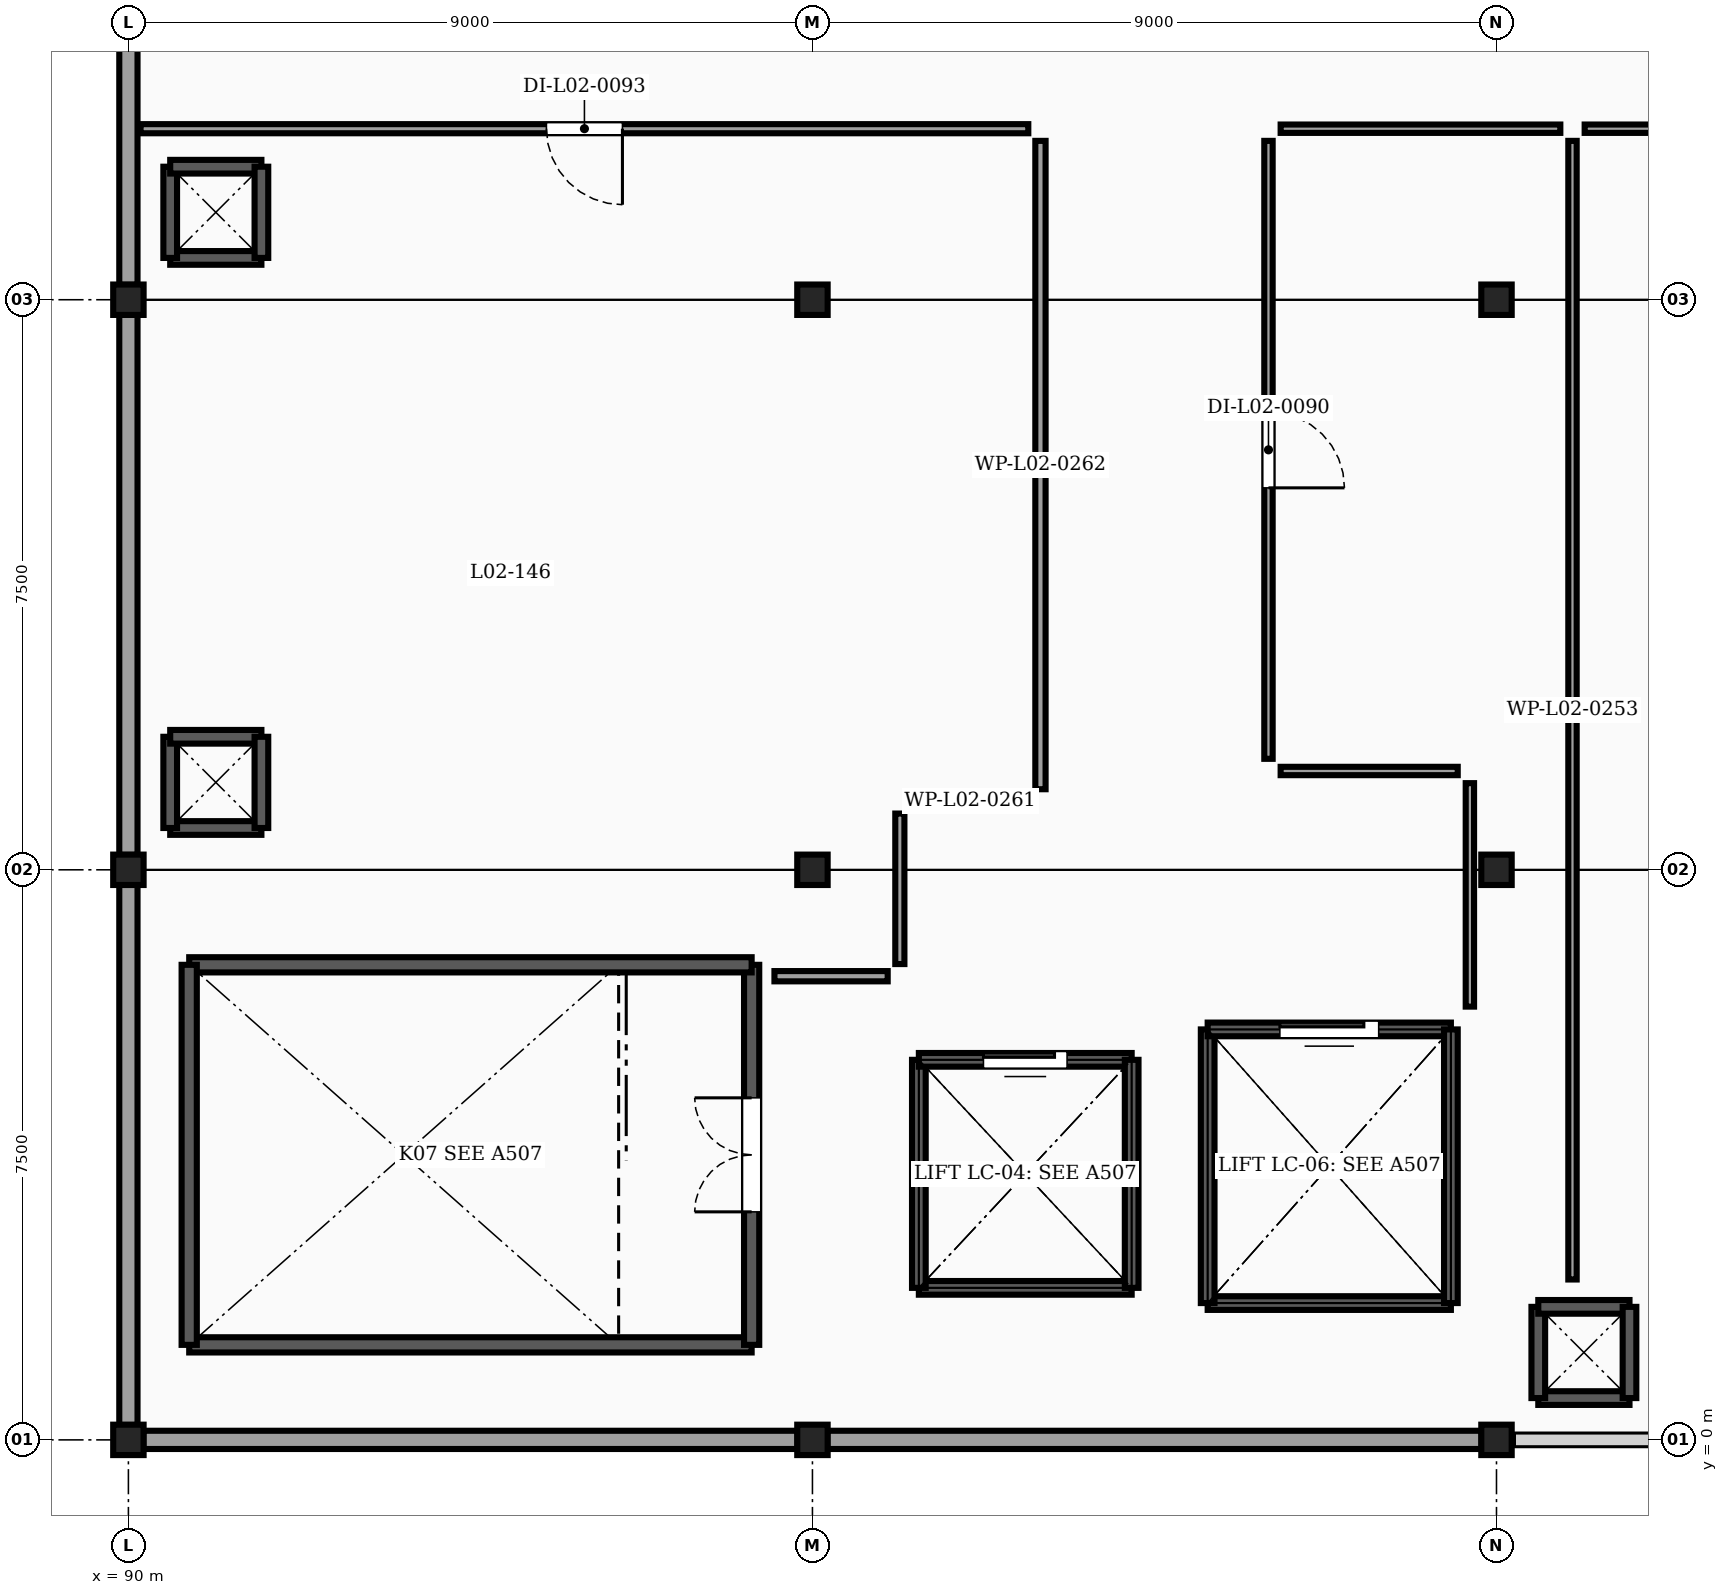
"""IFC4 building model, lengths in metres.
Left out: names, types, materials, properties, quantities, classifications, styles, units other than length and angle.
Written with IfcOpenShell. Run it as: python <this file> out.ifc"""

import sys

from ifc_helpers import new_model, si_unit, direction, frame, frame_2d, origin, origin_2d, place, context, subcontext, project, spatial, rectangle, extrude, element, fill, save


model = new_model("IFC4")
c1 = context("Model", 3, precision=1e-05, world=origin(), true_north=direction((0.0, 1.0)))
c2 = subcontext(c1, "Body", "Model", "MODEL_VIEW")
j1 = project(units=[si_unit("LENGTHUNIT", "METRE"), si_unit("PLANEANGLEUNIT", "RADIAN")], contexts=[c1])
p1 = place(None, origin())
s1 = spatial("IfcSite", under=j1, at=p1, CompositionType="ELEMENT")
p2 = place(p1, origin())
s2 = spatial("IfcBuilding", under=s1, at=p2, CompositionType="ELEMENT")
p3 = place(p2, frame((0.0, 0.0, 8.5)))
s3 = spatial("IfcBuildingStorey", under=s2, at=p3, CompositionType="ELEMENT", Elevation=8.5)
for number, where, z_axis, x_axis in (
    (1, (90.0, 0.0, 0.0), (0.0, 0.0, 1.0), (1.0, 0.0, 0.0)),
    (2, (99.0, 0.0, 0.0), (0.0, 0.0, 1.0), (1.0, 0.0, 0.0)),
    (3, (108.0, 0.0, 0.0), (0.0, 0.0, 1.0), (1.0, 0.0, 0.0)),
    (4, (90.0, 7.5, 0.0), (0.0, 0.0, 1.0), (1.0, 0.0, 0.0)),
    (5, (99.0, 7.5, 0.0), (0.0, 0.0, 1.0), (1.0, 0.0, 0.0)),
    (6, (108.0, 7.5, 0.0), (0.0, 0.0, 1.0), (1.0, 0.0, 0.0)),
    (7, (90.0, 15.0, 0.0), (0.0, 0.0, 1.0), (1.0, 0.0, 0.0)),
    (8, (99.0, 15.0, 0.0), (0.0, 0.0, 1.0), (1.0, 0.0, 0.0)),
    (9, (108.0, 15.0, 0.0), (0.0, 0.0, 1.0), (1.0, 0.0, 0.0)),
):
    element("IfcColumn", number, at=place(p3, frame(where, z_axis=z_axis, x_axis=x_axis)), inside=s3, PredefinedType="COLUMN", context=c2, shape_type="SweptSolid", body=[
        extrude(rectangle(XDim=0.4, YDim=0.4, at=origin_2d()), origin(), (0.0, 0.0, 1.0), 3.42),
    ])
for number, where, z_axis, x_axis in (
    (10, (107.804, 0.0, 0.0), (0.0, 0.0, 1.0), (-1.0, 0.0, 0.0)),
    (11, (98.804, 0.0, 0.0), (0.0, 0.0, 1.0), (-1.0, 0.0, 0.0)),
):
    element("IfcWall", number, at=place(p3, frame(where, z_axis=z_axis, x_axis=x_axis)), inside=s3, PredefinedType="SOLIDWALL", context=c2, shape_type="SweptSolid", body=[
        extrude(rectangle(XDim=8.608, YDim=0.24, at=frame_2d((4.304, 0.0))), origin(), (0.0, 0.0, 1.0), 2.827),
    ])
for number, where, z_axis, x_axis in (
    (12, (90.0, 0.196, 0.0), (0.0, 0.0, 1.0), (0.0, 1.0, 0.0)),
    (13, (90.0, 7.696, 0.0), (0.0, 0.0, 1.0), (0.0, 1.0, 0.0)),
    (14, (90.0, 15.196, 0.0), (0.0, 0.0, 1.0), (0.0, 1.0, 0.0)),
):
    element("IfcWall", number, at=place(p3, frame(where, z_axis=z_axis, x_axis=x_axis)), inside=s3, PredefinedType="SOLIDWALL", context=c2, shape_type="SweptSolid", body=[
        extrude(rectangle(XDim=7.108, YDim=0.24, at=frame_2d((3.554, 0.0))), origin(), (0.0, 0.0, 1.0), 2.827),
    ])
for number, where, z_axis, x_axis in (
    (15, (109.75, 0.55, 0.0), (0.0, 0.0, 1.0), (-1.0, 0.0, 0.0)),
    (16, (108.55, 0.55, 0.0), (0.0, 0.0, 1.0), (0.0, 1.0, 0.0)),
    (17, (108.55, 1.75, 0.0), (0.0, 0.0, 1.0), (1.0, 0.0, 0.0)),
    (18, (109.75, 1.75, 0.0), (0.0, 0.0, 1.0), (0.0, -1.0, 0.0)),
    (19, (91.75, 8.05, 0.0), (0.0, 0.0, 1.0), (-1.0, 0.0, 0.0)),
    (20, (90.55, 8.05, 0.0), (0.0, 0.0, 1.0), (0.0, 1.0, 0.0)),
    (21, (90.55, 9.25, 0.0), (0.0, 0.0, 1.0), (1.0, 0.0, 0.0)),
    (22, (91.75, 9.25, 0.0), (0.0, 0.0, 1.0), (0.0, -1.0, 0.0)),
    (23, (91.75, 15.55, 0.0), (0.0, 0.0, 1.0), (-1.0, 0.0, 0.0)),
    (24, (90.55, 15.55, 0.0), (0.0, 0.0, 1.0), (0.0, 1.0, 0.0)),
    (25, (90.55, 16.75, 0.0), (0.0, 0.0, 1.0), (1.0, 0.0, 0.0)),
    (26, (91.75, 16.75, 0.0), (0.0, 0.0, 1.0), (0.0, -1.0, 0.0)),
):
    element("IfcWall", number, at=place(p3, frame(where, z_axis=z_axis, x_axis=x_axis)), inside=s3, PredefinedType="SHEAR", context=c2, shape_type="SweptSolid", body=[
        extrude(rectangle(XDim=1.2, YDim=0.18, at=frame_2d((0.6, 0.0))), origin(), (0.0, 0.0, 1.0), 3.42),
    ])
p4 = place(p3, frame((90.8, 1.25, 0.0), z_axis=(0.0, 0.0, 1.0), x_axis=(1.0, 0.0, 0.0)))
e27 = element("IfcWall", 27, at=p4, inside=s3, PredefinedType="SHEAR", context=c2, shape_type="SweptSolid", body=[
    extrude(rectangle(XDim=7.4, YDim=0.2, at=frame_2d((3.7, 0.0))), origin(), (0.0, 0.0, 1.0), 3.42),
])
p5 = place(p3, frame((98.2, 1.25, 0.0), z_axis=(0.0, 0.0, 1.0), x_axis=(0.0, 1.0, 0.0)))
e28 = element("IfcWall", 28, at=p5, inside=s3, PredefinedType="SHEAR", context=c2, shape_type="SweptSolid", body=[
    extrude(rectangle(XDim=5.0, YDim=0.2, at=frame_2d((2.5, 0.0))), origin(), (0.0, 0.0, 1.0), 3.42),
])
p6 = place(p5, frame((1.75, 0.0, 0.0)))
e29 = element("IfcOpeningElement", 29, at=p6, cuts=e28, PredefinedType="OPENING", context=c2, shape_type="SweptSolid", body=[
    extrude(rectangle(XDim=1.5, YDim=2.15, at=frame_2d((0.75, 1.075))), frame((0.0, 0.11, 0.0), z_axis=(0.0, -1.0, 0.0), x_axis=(1.0, 0.0, 0.0)), (0.0, 0.0, 1.0), 0.22),
])
p7 = place(p3, frame((98.2, 6.25, 0.0), z_axis=(0.0, 0.0, 1.0), x_axis=(-1.0, 0.0, 0.0)))
e30 = element("IfcWall", 30, at=p7, inside=s3, PredefinedType="SHEAR", context=c2, shape_type="SweptSolid", body=[
    extrude(rectangle(XDim=7.4, YDim=0.2, at=frame_2d((3.7, 0.0))), origin(), (0.0, 0.0, 1.0), 3.42),
])
p8 = place(p3, frame((90.8, 6.25, 0.0), z_axis=(0.0, 0.0, 1.0), x_axis=(0.0, -1.0, 0.0)))
e31 = element("IfcWall", 31, at=p8, inside=s3, PredefinedType="SHEAR", context=c2, shape_type="SweptSolid", body=[
    extrude(rectangle(XDim=5.0, YDim=0.2, at=frame_2d((2.5, 0.0))), origin(), (0.0, 0.0, 1.0), 3.42),
])
p9 = place(p3, frame((103.2, 2.0, 0.0), z_axis=(0.0, 0.0, 1.0), x_axis=(-1.0, 0.0, 0.0)))
e32 = element("IfcWall", 32, at=p9, inside=s3, PredefinedType="SHEAR", context=c2, shape_type="SweptSolid", body=[
    extrude(rectangle(XDim=2.8, YDim=0.18, at=frame_2d((1.4, 0.0))), origin(), (0.0, 0.0, 1.0), 3.42),
])
p10 = place(p3, frame((100.4, 2.0, 0.0), z_axis=(0.0, 0.0, 1.0), x_axis=(0.0, 1.0, 0.0)))
e33 = element("IfcWall", 33, at=p10, inside=s3, PredefinedType="SHEAR", context=c2, shape_type="SweptSolid", body=[
    extrude(rectangle(XDim=3.0, YDim=0.18, at=frame_2d((1.5, 0.0))), origin(), (0.0, 0.0, 1.0), 3.42),
])
p11 = place(p3, frame((100.4, 5.0, 0.0), z_axis=(0.0, 0.0, 1.0), x_axis=(1.0, 0.0, 0.0)))
e34 = element("IfcWall", 34, at=p11, inside=s3, PredefinedType="SHEAR", context=c2, shape_type="SweptSolid", body=[
    extrude(rectangle(XDim=2.8, YDim=0.18, at=frame_2d((1.4, 0.0))), origin(), (0.0, 0.0, 1.0), 3.42),
])
p12 = place(p11, frame((0.85, 0.0, 0.0)))
e35 = element("IfcOpeningElement", 35, at=p12, cuts=e34, PredefinedType="OPENING", context=c2, shape_type="SweptSolid", body=[
    extrude(rectangle(XDim=1.1, YDim=2.15, at=frame_2d((0.55, 1.075))), frame((0.0, 0.1, 0.0), z_axis=(0.0, -1.0, 0.0), x_axis=(1.0, 0.0, 0.0)), (0.0, 0.0, 1.0), 0.2),
])
p13 = place(p3, frame((103.2, 5.0, 0.0), z_axis=(0.0, 0.0, 1.0), x_axis=(0.0, -1.0, 0.0)))
e36 = element("IfcWall", 36, at=p13, inside=s3, PredefinedType="SHEAR", context=c2, shape_type="SweptSolid", body=[
    extrude(rectangle(XDim=3.0, YDim=0.18, at=frame_2d((1.5, 0.0))), origin(), (0.0, 0.0, 1.0), 3.42),
])
p14 = place(p3, frame((107.4, 1.8, 0.0), z_axis=(0.0, 0.0, 1.0), x_axis=(-1.0, 0.0, 0.0)))
e37 = element("IfcWall", 37, at=p14, inside=s3, PredefinedType="SHEAR", context=c2, shape_type="SweptSolid", body=[
    extrude(rectangle(XDim=3.2, YDim=0.18, at=frame_2d((1.6, 0.0))), origin(), (0.0, 0.0, 1.0), 3.42),
])
p15 = place(p3, frame((104.2, 1.8, 0.0), z_axis=(0.0, 0.0, 1.0), x_axis=(0.0, 1.0, 0.0)))
e38 = element("IfcWall", 38, at=p15, inside=s3, PredefinedType="SHEAR", context=c2, shape_type="SweptSolid", body=[
    extrude(rectangle(XDim=3.6, YDim=0.18, at=frame_2d((1.8, 0.0))), origin(), (0.0, 0.0, 1.0), 3.42),
])
p16 = place(p3, frame((104.2, 5.4, 0.0), z_axis=(0.0, 0.0, 1.0), x_axis=(1.0, 0.0, 0.0)))
e39 = element("IfcWall", 39, at=p16, inside=s3, PredefinedType="SHEAR", context=c2, shape_type="SweptSolid", body=[
    extrude(rectangle(XDim=3.2, YDim=0.18, at=frame_2d((1.6, 0.0))), origin(), (0.0, 0.0, 1.0), 3.42),
])
p17 = place(p16, frame((0.95, 0.0, 0.0)))
e40 = element("IfcOpeningElement", 40, at=p17, cuts=e39, PredefinedType="OPENING", context=c2, shape_type="SweptSolid", body=[
    extrude(rectangle(XDim=1.3, YDim=2.2, at=frame_2d((0.65, 1.1))), frame((0.0, 0.1, 0.0), z_axis=(0.0, -1.0, 0.0), x_axis=(1.0, 0.0, 0.0)), (0.0, 0.0, 1.0), 0.2),
])
p18 = place(p3, frame((107.4, 5.4, 0.0), z_axis=(0.0, 0.0, 1.0), x_axis=(0.0, -1.0, 0.0)))
e41 = element("IfcWall", 41, at=p18, inside=s3, PredefinedType="SHEAR", context=c2, shape_type="SweptSolid", body=[
    extrude(rectangle(XDim=3.6, YDim=0.18, at=frame_2d((1.8, 0.0))), origin(), (0.0, 0.0, 1.0), 3.42),
])
p19 = place(p3, frame((109.0, 2.11, 0.0), z_axis=(0.0, 0.0, 1.0), x_axis=(0.0, 1.0, 0.0)))
e42 = element("IfcWall", 42, at=p19, inside=s3, PredefinedType="PARTITIONING", context=c2, shape_type="SweptSolid", body=[
    extrude(rectangle(XDim=14.98, YDim=0.11, at=frame_2d((7.49, 0.0))), origin(), (0.0, 0.0, 1.0), 3.42),
])
p20 = place(p3, frame((107.65, 8.64, 0.0), z_axis=(0.0, 0.0, 1.0), x_axis=(0.0, -1.0, 0.0)))
e43 = element("IfcWall", 43, at=p20, inside=s3, PredefinedType="PARTITIONING", context=c2, shape_type="SweptSolid", body=[
    extrude(rectangle(XDim=2.94, YDim=0.11, at=frame_2d((1.47, 0.0))), origin(), (0.0, 0.0, 1.0), 3.42),
])
p21 = place(p3, frame((105.16, 8.8, 0.0), z_axis=(0.0, 0.0, 1.0), x_axis=(1.0, 0.0, 0.0)))
e44 = element("IfcWall", 44, at=p21, inside=s3, PredefinedType="PARTITIONING", context=c2, shape_type="SweptSolid", body=[
    extrude(rectangle(XDim=2.33, YDim=0.11, at=frame_2d((1.165, 0.0))), origin(), (0.0, 0.0, 1.0), 3.42),
])
p22 = place(p3, frame((105.0, 17.09, 0.0), z_axis=(0.0, 0.0, 1.0), x_axis=(0.0, -1.0, 0.0)))
e45 = element("IfcWall", 45, at=p22, inside=s3, PredefinedType="PARTITIONING", context=c2, shape_type="SweptSolid", body=[
    extrude(rectangle(XDim=8.13, YDim=0.11, at=frame_2d((4.065, 0.0))), origin(), (0.0, 0.0, 1.0), 3.112),
])
p23 = place(p22, frame((3.565, 0.0, 0.0)))
e46 = element("IfcOpeningElement", 46, at=p23, cuts=e45, PredefinedType="OPENING", context=c2, shape_type="SweptSolid", body=[
    extrude(rectangle(XDim=1.0, YDim=2.15, at=frame_2d((0.5, 1.075))), frame((0.0, 0.065, 0.0), z_axis=(0.0, -1.0, 0.0), x_axis=(1.0, 0.0, 0.0)), (0.0, 0.0, 1.0), 0.13),
])
p24 = place(p3, frame((108.84, 17.25, 0.0), z_axis=(0.0, 0.0, 1.0), x_axis=(-1.0, 0.0, 0.0)))
e47 = element("IfcWall", 47, at=p24, inside=s3, PredefinedType="PARTITIONING", context=c2, shape_type="SweptSolid", body=[
    extrude(rectangle(XDim=3.68, YDim=0.11, at=frame_2d((1.84, 0.0))), origin(), (0.0, 0.0, 1.0), 3.42),
])
p25 = place(p3, frame((112.84, 17.25, 0.0), z_axis=(0.0, 0.0, 1.0), x_axis=(-1.0, 0.0, 0.0)))
e48 = element("IfcWall", 48, at=p25, inside=s3, PredefinedType="PARTITIONING", context=c2, shape_type="SweptSolid", body=[
    extrude(rectangle(XDim=3.68, YDim=0.11, at=frame_2d((1.84, 0.0))), origin(), (0.0, 0.0, 1.0), 3.42),
])
p26 = place(p25, frame((1.34, 0.0, 0.0)))
e49 = element("IfcOpeningElement", 49, at=p26, cuts=e48, PredefinedType="OPENING", context=c2, shape_type="SweptSolid", body=[
    extrude(rectangle(XDim=1.0, YDim=2.15, at=frame_2d((0.5, 1.075))), frame((0.0, 0.065, 0.0), z_axis=(0.0, -1.0, 0.0), x_axis=(1.0, 0.0, 0.0)), (0.0, 0.0, 1.0), 0.13),
])
p27 = place(p3, frame((100.31, 8.4, 0.0), z_axis=(0.0, 0.0, 1.0), x_axis=(1.0, 0.0, 0.0)))
e50 = element("IfcWall", 50, at=p27, inside=s3, PredefinedType="PARTITIONING", context=c2, shape_type="SweptSolid", body=[
    extrude(rectangle(XDim=1.53, YDim=0.12, at=frame_2d((0.765, 0.0))), origin(), (0.0, 0.0, 1.0), 3.42),
])
p28 = place(p3, frame((102.0, 8.56, 0.0), z_axis=(0.0, 0.0, 1.0), x_axis=(0.0, 1.0, 0.0)))
e51 = element("IfcWall", 51, at=p28, inside=s3, PredefinedType="PARTITIONING", context=c2, shape_type="SweptSolid", body=[
    extrude(rectangle(XDim=8.53, YDim=0.135, at=frame_2d((4.265, 0.0))), origin(), (0.0, 0.0, 1.0), 3.42),
])
p29 = place(p3, frame((101.84, 17.25, 0.0), z_axis=(0.0, 0.0, 1.0), x_axis=(-1.0, 0.0, 0.0)))
e52 = element("IfcWall", 52, at=p29, inside=s3, PredefinedType="PARTITIONING", context=c2, shape_type="SweptSolid", body=[
    extrude(rectangle(XDim=11.68, YDim=0.12, at=frame_2d((5.84, 0.0))), origin(), (0.0, 0.0, 1.0), 3.42),
])
p30 = place(p29, frame((5.34, 0.0, 0.0)))
e53 = element("IfcOpeningElement", 53, at=p30, cuts=e52, PredefinedType="OPENING", context=c2, shape_type="SweptSolid", body=[
    extrude(rectangle(XDim=1.0, YDim=2.15, at=frame_2d((0.5, 1.075))), frame((0.0, 0.07, 0.0), z_axis=(0.0, -1.0, 0.0), x_axis=(1.0, 0.0, 0.0)), (0.0, 0.0, 1.0), 0.14),
])
p31 = place(p3, frame((98.5, 6.1, 0.0), z_axis=(0.0, 0.0, 1.0), x_axis=(1.0, 0.0, 0.0)))
e54 = element("IfcWall", 54, at=p31, inside=s3, PredefinedType="PARTITIONING", context=c2, shape_type="SweptSolid", body=[
    extrude(rectangle(XDim=1.49, YDim=0.135, at=frame_2d((0.745, 0.0))), origin(), (0.0, 0.0, 1.0), 3.42),
])
p32 = place(p3, frame((100.15, 6.26, 0.0), z_axis=(0.0, 0.0, 1.0), x_axis=(0.0, 1.0, 0.0)))
e55 = element("IfcWall", 55, at=p32, inside=s3, PredefinedType="PARTITIONING", context=c2, shape_type="SweptSolid", body=[
    extrude(rectangle(XDim=1.98, YDim=0.12, at=frame_2d((0.99, 0.0))), origin(), (0.0, 0.0, 1.0), 3.42),
])
p33 = place(p6, origin())
e56 = element("IfcDoor", 56, at=p33, inside=s3, OperationType="DOUBLE_DOOR_SINGLE_SWING", PredefinedType="DOOR", context=c2, shape_type="SweptSolid", body=[
    extrude(rectangle(XDim=1.5, YDim=2.15, at=frame_2d((0.75, 1.075))), frame((0.0, 0.025, 0.0), z_axis=(0.0, -1.0, 0.0), x_axis=(1.0, 0.0, 0.0)), (0.0, 0.0, 1.0), 0.05),
])
fill(e29, e56)
p34 = place(p12, origin())
e57 = element("IfcDoor", 57, at=p34, inside=s3, OperationType="SLIDING_TO_LEFT", PredefinedType="DOOR", context=c2, shape_type="SweptSolid", body=[
    extrude(rectangle(XDim=1.1, YDim=2.15, at=frame_2d((0.55, 1.075))), frame((0.0, 0.025, 0.0), z_axis=(0.0, -1.0, 0.0), x_axis=(1.0, 0.0, 0.0)), (0.0, 0.0, 1.0), 0.05),
])
fill(e35, e57)
p35 = place(p17, origin())
e58 = element("IfcDoor", 58, at=p35, inside=s3, OperationType="SLIDING_TO_LEFT", PredefinedType="DOOR", context=c2, shape_type="SweptSolid", body=[
    extrude(rectangle(XDim=1.3, YDim=2.2, at=frame_2d((0.65, 1.1))), frame((0.0, 0.025, 0.0), z_axis=(0.0, -1.0, 0.0), x_axis=(1.0, 0.0, 0.0)), (0.0, 0.0, 1.0), 0.05),
])
fill(e40, e58)
p36 = place(p23, origin())
e59 = element("IfcDoor", 59, at=p36, inside=s3, OperationType="SINGLE_SWING_RIGHT", PredefinedType="DOOR", context=c2, shape_type="SweptSolid", body=[
    extrude(rectangle(XDim=1.0, YDim=2.15, at=frame_2d((0.5, 1.075))), frame((0.0, 0.025, 0.0), z_axis=(0.0, -1.0, 0.0), x_axis=(1.0, 0.0, 0.0)), (0.0, 0.0, 1.0), 0.05),
])
fill(e46, e59)
p37 = place(p30, origin())
e60 = element("IfcDoor", 60, at=p37, inside=s3, OperationType="SINGLE_SWING_LEFT", PredefinedType="DOOR", context=c2, shape_type="SweptSolid", body=[
    extrude(rectangle(XDim=1.0, YDim=2.15, at=frame_2d((0.5, 1.075))), frame((0.0, 0.025, 0.0), z_axis=(0.0, -1.0, 0.0), x_axis=(1.0, 0.0, 0.0)), (0.0, 0.0, 1.0), 0.05),
])
fill(e53, e60)
save(model, sys.argv[1])
